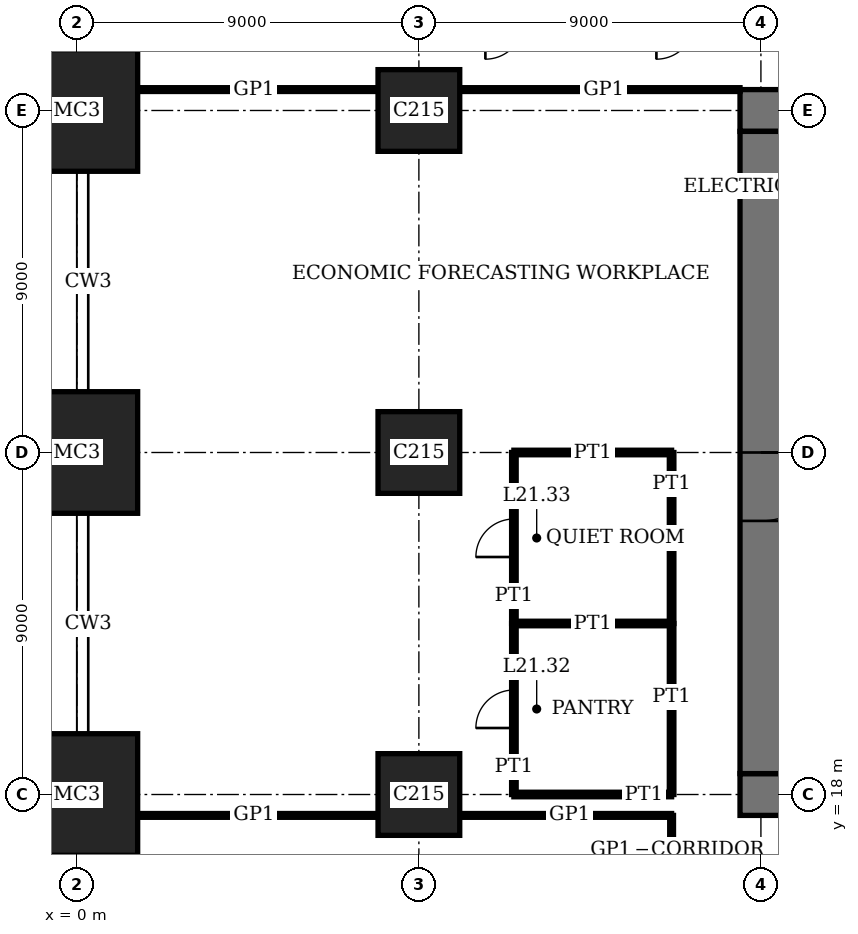
"""IFC4 building model, lengths in metres.
Left out: names, types, materials, properties, quantities, classifications, styles, units other than length and angle.
Written with IfcOpenShell. Run it as: python <this file> out.ifc"""

import sys

from ifc_helpers import new_model, si_unit, direction, frame, frame_2d, origin, origin_2d, place, context, subcontext, project, spatial, rectangle, extrude, element, fill, save


model = new_model("IFC4")
c1 = context("Model", 3, precision=1e-05, world=origin(), true_north=direction((0.0, 1.0)))
c2 = subcontext(c1, "Body", "Model", "MODEL_VIEW")
j1 = project(units=[si_unit("LENGTHUNIT", "METRE"), si_unit("PLANEANGLEUNIT", "RADIAN")], contexts=[c1])
p1 = place(None, origin())
s1 = spatial("IfcSite", under=j1, at=p1, CompositionType="ELEMENT")
p2 = place(p1, origin())
s2 = spatial("IfcBuilding", under=s1, at=p2, CompositionType="ELEMENT")
p3 = place(p2, frame((0.0, 0.0, 89.0)))
s3 = spatial("IfcBuildingStorey", under=s2, at=p3, CompositionType="ELEMENT", Elevation=89.0)
for number, where, z_axis, x_axis in (
    (1, (0.0, 18.0, 0.0), (0.0, 0.0, 1.0), (1.0, 0.0, 0.0)),
    (2, (0.0, 27.0, 0.0), (0.0, 0.0, 1.0), (1.0, 0.0, 0.0)),
    (3, (0.0, 36.0, 0.0), (0.0, 0.0, 1.0), (1.0, 0.0, 0.0)),
):
    element("IfcColumn", number, at=place(p3, frame(where, z_axis=z_axis, x_axis=x_axis)), inside=s3, PredefinedType="COLUMN", context=c2, shape_type="SweptSolid", body=[
        extrude(rectangle(XDim=3.2, YDim=3.2, at=origin_2d()), origin(), (0.0, 0.0, 1.0), 4.0),
    ])
for number, where, z_axis, x_axis in (
    (4, (9.0, 18.0, 0.0), (0.0, 0.0, 1.0), (1.0, 0.0, 0.0)),
    (5, (9.0, 27.0, 0.0), (0.0, 0.0, 1.0), (1.0, 0.0, 0.0)),
    (6, (9.0, 36.0, 0.0), (0.0, 0.0, 1.0), (1.0, 0.0, 0.0)),
):
    element("IfcColumn", number, at=place(p3, frame(where, z_axis=z_axis, x_axis=x_axis)), inside=s3, PredefinedType="COLUMN", context=c2, shape_type="SweptSolid", body=[
        extrude(rectangle(XDim=2.15, YDim=2.15, at=origin_2d()), origin(), (0.0, 0.0, 1.0), 4.0),
    ])
p4 = place(p3, frame((17.45, 18.0, 0.0), z_axis=(0.0, 0.0, 1.0), x_axis=(1.0, 0.0, 0.0)))
e7 = element("IfcWall", 7, at=p4, inside=s3, PredefinedType="SHEAR", context=c2, shape_type="SweptSolid", body=[
    extrude(rectangle(XDim=28.1, YDim=1.1, at=frame_2d((14.05, 0.0))), origin(), (0.0, 0.0, 1.0), 4.0),
])
p5 = place(p4, frame((11.55, 0.0, 0.0)))
e8 = element("IfcOpeningElement", 8, at=p5, cuts=e7, PredefinedType="OPENING", context=c2, shape_type="SweptSolid", body=[
    extrude(rectangle(XDim=1.0, YDim=2.4, at=frame_2d((0.5, 1.2))), frame((0.0, 0.56, 0.0), z_axis=(0.0, -1.0, 0.0), x_axis=(1.0, 0.0, 0.0)), (0.0, 0.0, 1.0), 1.12),
])
p6 = place(p4, frame((16.55, 0.0, 0.0)))
e9 = element("IfcOpeningElement", 9, at=p6, cuts=e7, PredefinedType="OPENING", context=c2, shape_type="SweptSolid", body=[
    extrude(rectangle(XDim=1.0, YDim=2.4, at=frame_2d((0.5, 1.2))), frame((0.0, 0.56, 0.0), z_axis=(0.0, -1.0, 0.0), x_axis=(1.0, 0.0, 0.0)), (0.0, 0.0, 1.0), 1.12),
])
p7 = place(p4, frame((20.0, 0.0, 0.0)))
e10 = element("IfcOpeningElement", 10, at=p7, cuts=e7, PredefinedType="OPENING", context=c2, shape_type="SweptSolid", body=[
    extrude(rectangle(XDim=1.1, YDim=2.4, at=frame_2d((0.55, 1.2))), frame((0.0, 0.56, 0.0), z_axis=(0.0, -1.0, 0.0), x_axis=(1.0, 0.0, 0.0)), (0.0, 0.0, 1.0), 1.12),
])
p8 = place(p4, frame((24.05, 0.0, 0.0)))
e11 = element("IfcOpeningElement", 11, at=p8, cuts=e7, PredefinedType="OPENING", context=c2, shape_type="SweptSolid", body=[
    extrude(rectangle(XDim=1.0, YDim=2.4, at=frame_2d((0.5, 1.2))), frame((0.0, 0.56, 0.0), z_axis=(0.0, -1.0, 0.0), x_axis=(1.0, 0.0, 0.0)), (0.0, 0.0, 1.0), 1.12),
])
p9 = place(p3, frame((45.55, 36.0, 0.0), z_axis=(0.0, 0.0, 1.0), x_axis=(-1.0, 0.0, 0.0)))
e12 = element("IfcWall", 12, at=p9, inside=s3, PredefinedType="SHEAR", context=c2, shape_type="SweptSolid", body=[
    extrude(rectangle(XDim=28.1, YDim=1.1, at=frame_2d((14.05, 0.0))), origin(), (0.0, 0.0, 1.0), 4.0),
])
p10 = place(p9, frame((11.55, 0.0, 0.0)))
e13 = element("IfcOpeningElement", 13, at=p10, cuts=e12, PredefinedType="OPENING", context=c2, shape_type="SweptSolid", body=[
    extrude(rectangle(XDim=1.0, YDim=2.4, at=frame_2d((0.5, 1.2))), frame((0.0, 0.56, 0.0), z_axis=(0.0, -1.0, 0.0), x_axis=(1.0, 0.0, 0.0)), (0.0, 0.0, 1.0), 1.12),
])
p11 = place(p9, frame((16.55, 0.0, 0.0)))
e14 = element("IfcOpeningElement", 14, at=p11, cuts=e12, PredefinedType="OPENING", context=c2, shape_type="SweptSolid", body=[
    extrude(rectangle(XDim=1.0, YDim=2.4, at=frame_2d((0.5, 1.2))), frame((0.0, 0.56, 0.0), z_axis=(0.0, -1.0, 0.0), x_axis=(1.0, 0.0, 0.0)), (0.0, 0.0, 1.0), 1.12),
])
p12 = place(p9, frame((20.0, 0.0, 0.0)))
e15 = element("IfcOpeningElement", 15, at=p12, cuts=e12, PredefinedType="OPENING", context=c2, shape_type="SweptSolid", body=[
    extrude(rectangle(XDim=1.1, YDim=2.4, at=frame_2d((0.55, 1.2))), frame((0.0, 0.56, 0.0), z_axis=(0.0, -1.0, 0.0), x_axis=(1.0, 0.0, 0.0)), (0.0, 0.0, 1.0), 1.12),
])
p13 = place(p9, frame((24.05, 0.0, 0.0)))
e16 = element("IfcOpeningElement", 16, at=p13, cuts=e12, PredefinedType="OPENING", context=c2, shape_type="SweptSolid", body=[
    extrude(rectangle(XDim=1.0, YDim=2.4, at=frame_2d((0.5, 1.2))), frame((0.0, 0.56, 0.0), z_axis=(0.0, -1.0, 0.0), x_axis=(1.0, 0.0, 0.0)), (0.0, 0.0, 1.0), 1.12),
])
p14 = place(p3, frame((18.0, 35.45, 0.0), z_axis=(0.0, 0.0, 1.0), x_axis=(0.0, -1.0, 0.0)))
e17 = element("IfcWall", 17, at=p14, inside=s3, PredefinedType="SHEAR", context=c2, shape_type="SweptSolid", body=[
    extrude(rectangle(XDim=16.9, YDim=1.1, at=frame_2d((8.45, 0.0))), origin(), (0.0, 0.0, 1.0), 4.0),
])
p15 = place(p14, frame((8.45, 0.0, 0.0)))
e18 = element("IfcOpeningElement", 18, at=p15, cuts=e17, PredefinedType="OPENING", context=c2, shape_type="SweptSolid", body=[
    extrude(rectangle(XDim=1.8, YDim=2.4, at=frame_2d((0.9, 1.2))), frame((0.0, 0.56, 0.0), z_axis=(0.0, -1.0, 0.0), x_axis=(1.0, 0.0, 0.0)), (0.0, 0.0, 1.0), 1.12),
])
p16 = place(p3, frame((1.6, 17.45, 0.0), z_axis=(0.0, 0.0, 1.0), x_axis=(1.0, 0.0, 0.0)))
e19 = element("IfcWall", 19, at=p16, inside=s3, PredefinedType="PARTITIONING", context=c2, shape_type="SweptSolid", body=[
    extrude(rectangle(XDim=6.325, YDim=0.1, at=frame_2d((3.163, 0.0))), origin(), (0.0, 0.0, 1.0), 3.75),
])
p17 = place(p3, frame((10.075, 17.45, 0.0), z_axis=(0.0, 0.0, 1.0), x_axis=(1.0, 0.0, 0.0)))
e20 = element("IfcWall", 20, at=p17, inside=s3, PredefinedType="PARTITIONING", context=c2, shape_type="SweptSolid", body=[
    extrude(rectangle(XDim=5.575, YDim=0.1, at=frame_2d((2.788, 0.0))), origin(), (0.0, 0.0, 1.0), 3.75),
])
p18 = place(p3, frame((11.5, 18.0, 0.0), z_axis=(0.0, 0.0, 1.0), x_axis=(1.0, 0.0, 0.0)))
e21 = element("IfcWall", 21, at=p18, inside=s3, PredefinedType="PARTITIONING", context=c2, shape_type="SweptSolid", body=[
    extrude(rectangle(XDim=4.15, YDim=0.12, at=frame_2d((2.075, 0.0))), origin(), (0.0, 0.0, 1.0), 3.05),
])
p19 = place(p3, frame((11.5, 22.5, 0.0), z_axis=(0.0, 0.0, 1.0), x_axis=(1.0, 0.0, 0.0)))
e22 = element("IfcWall", 22, at=p19, inside=s3, PredefinedType="PARTITIONING", context=c2, shape_type="SweptSolid", body=[
    extrude(rectangle(XDim=4.15, YDim=0.12, at=frame_2d((2.075, 0.0))), origin(), (0.0, 0.0, 1.0), 3.1),
])
p20 = place(p3, frame((11.5, 27.0, 0.0), z_axis=(0.0, 0.0, 1.0), x_axis=(1.0, 0.0, 0.0)))
e23 = element("IfcWall", 23, at=p20, inside=s3, PredefinedType="PARTITIONING", context=c2, shape_type="SweptSolid", body=[
    extrude(rectangle(XDim=4.15, YDim=0.12, at=frame_2d((2.075, 0.0))), origin(), (0.0, 0.0, 1.0), 3.05),
])
p21 = place(p3, frame((1.6, 36.55, 0.0), z_axis=(0.0, 0.0, 1.0), x_axis=(1.0, 0.0, 0.0)))
e24 = element("IfcWall", 24, at=p21, inside=s3, PredefinedType="PARTITIONING", context=c2, shape_type="SweptSolid", body=[
    extrude(rectangle(XDim=6.325, YDim=0.1, at=frame_2d((3.163, 0.0))), origin(), (0.0, 0.0, 1.0), 3.75),
])
p22 = place(p3, frame((10.075, 36.55, 0.0), z_axis=(0.0, 0.0, 1.0), x_axis=(1.0, 0.0, 0.0)))
e25 = element("IfcWall", 25, at=p22, inside=s3, PredefinedType="PARTITIONING", context=c2, shape_type="SweptSolid", body=[
    extrude(rectangle(XDim=7.375, YDim=0.1, at=frame_2d((3.688, 0.0))), origin(), (0.0, 0.0, 1.0), 3.75),
])
p23 = place(p3, frame((11.5, 18.0, 0.0), z_axis=(0.0, 0.0, 1.0), x_axis=(0.0, 1.0, 0.0)))
e26 = element("IfcWall", 26, at=p23, inside=s3, PredefinedType="PARTITIONING", context=c2, shape_type="SweptSolid", body=[
    extrude(rectangle(XDim=4.5, YDim=0.12, at=frame_2d((2.25, 0.0))), origin(), (0.0, 0.0, 1.0), 3.75),
])
p24 = place(p23, frame((1.75, 0.0, 0.0)))
e27 = element("IfcOpeningElement", 27, at=p24, cuts=e26, PredefinedType="OPENING", context=c2, shape_type="SweptSolid", body=[
    extrude(rectangle(XDim=1.0, YDim=2.4, at=frame_2d((0.5, 1.2))), frame((0.0, 0.07, 0.0), z_axis=(0.0, -1.0, 0.0), x_axis=(1.0, 0.0, 0.0)), (0.0, 0.0, 1.0), 0.14),
])
p25 = place(p3, frame((11.5, 22.5, 0.0), z_axis=(0.0, 0.0, 1.0), x_axis=(0.0, 1.0, 0.0)))
e28 = element("IfcWall", 28, at=p25, inside=s3, PredefinedType="PARTITIONING", context=c2, shape_type="SweptSolid", body=[
    extrude(rectangle(XDim=4.5, YDim=0.12, at=frame_2d((2.25, 0.0))), origin(), (0.0, 0.0, 1.0), 3.75),
])
p26 = place(p25, frame((1.75, 0.0, 0.0)))
e29 = element("IfcOpeningElement", 29, at=p26, cuts=e28, PredefinedType="OPENING", context=c2, shape_type="SweptSolid", body=[
    extrude(rectangle(XDim=1.0, YDim=2.4, at=frame_2d((0.5, 1.2))), frame((0.0, 0.07, 0.0), z_axis=(0.0, -1.0, 0.0), x_axis=(1.0, 0.0, 0.0)), (0.0, 0.0, 1.0), 0.14),
])
for number, where, z_axis, x_axis in (
    (30, (15.65, 18.0, 0.0), (0.0, 0.0, 1.0), (0.0, 1.0, 0.0)),
    (31, (15.65, 22.5, 0.0), (0.0, 0.0, 1.0), (0.0, 1.0, 0.0)),
):
    element("IfcWall", number, at=place(p3, frame(where, z_axis=z_axis, x_axis=x_axis)), inside=s3, PredefinedType="PARTITIONING", context=c2, shape_type="SweptSolid", body=[
        extrude(rectangle(XDim=4.5, YDim=0.12, at=frame_2d((2.25, 0.0))), origin(), (0.0, 0.0, 1.0), 3.75),
    ])
p27 = place(p3, frame((15.65, 15.65, 0.0), z_axis=(0.0, 0.0, 1.0), x_axis=(0.0, 1.0, 0.0)))
e32 = element("IfcWall", 32, at=p27, inside=s3, PredefinedType="PARTITIONING", context=c2, shape_type="SweptSolid", body=[
    extrude(rectangle(XDim=1.8, YDim=0.1, at=frame_2d((0.9, 0.0))), origin(), (0.0, 0.0, 1.0), 3.75),
])
p28 = place(p15, origin())
e33 = element("IfcDoor", 33, at=p28, inside=s3, OperationType="DOUBLE_DOOR_DOUBLE_SWING", PredefinedType="DOOR", context=c2, shape_type="SweptSolid", body=[
    extrude(rectangle(XDim=1.8, YDim=2.4, at=frame_2d((0.9, 1.2))), frame((0.0, 0.03, 0.0), z_axis=(0.0, -1.0, 0.0), x_axis=(1.0, 0.0, 0.0)), (0.0, 0.0, 1.0), 0.06),
    extrude(rectangle(XDim=0.04, YDim=2.4, at=frame_2d((0.02, 1.2))), frame((0.0, 0.55, 0.0), z_axis=(0.0, -1.0, 0.0), x_axis=(1.0, 0.0, 0.0)), (0.0, 0.0, 1.0), 1.1),
    extrude(rectangle(XDim=0.04, YDim=2.4, at=frame_2d((1.78, 1.2))), frame((0.0, 0.55, 0.0), z_axis=(0.0, -1.0, 0.0), x_axis=(1.0, 0.0, 0.0)), (0.0, 0.0, 1.0), 1.1),
    extrude(rectangle(XDim=1.8, YDim=0.04, at=frame_2d((0.9, 2.38))), frame((0.0, 0.55, 0.0), z_axis=(0.0, -1.0, 0.0), x_axis=(1.0, 0.0, 0.0)), (0.0, 0.0, 1.0), 1.1),
])
fill(e18, e33)
p29 = place(p24, origin())
e34 = element("IfcDoor", 34, at=p29, inside=s3, OperationType="SINGLE_SWING_RIGHT", PredefinedType="DOOR", context=c2, shape_type="SweptSolid", body=[
    extrude(rectangle(XDim=1.0, YDim=2.4, at=frame_2d((0.5, 1.2))), frame((0.0, 0.025, 0.0), z_axis=(0.0, -1.0, 0.0), x_axis=(1.0, 0.0, 0.0)), (0.0, 0.0, 1.0), 0.05),
])
fill(e27, e34)
p30 = place(p26, origin())
e35 = element("IfcDoor", 35, at=p30, inside=s3, OperationType="SINGLE_SWING_RIGHT", PredefinedType="DOOR", context=c2, shape_type="SweptSolid", body=[
    extrude(rectangle(XDim=1.0, YDim=2.4, at=frame_2d((0.5, 1.2))), frame((0.0, 0.025, 0.0), z_axis=(0.0, -1.0, 0.0), x_axis=(1.0, 0.0, 0.0)), (0.0, 0.0, 1.0), 0.05),
])
fill(e29, e35)
save(model, sys.argv[1])
